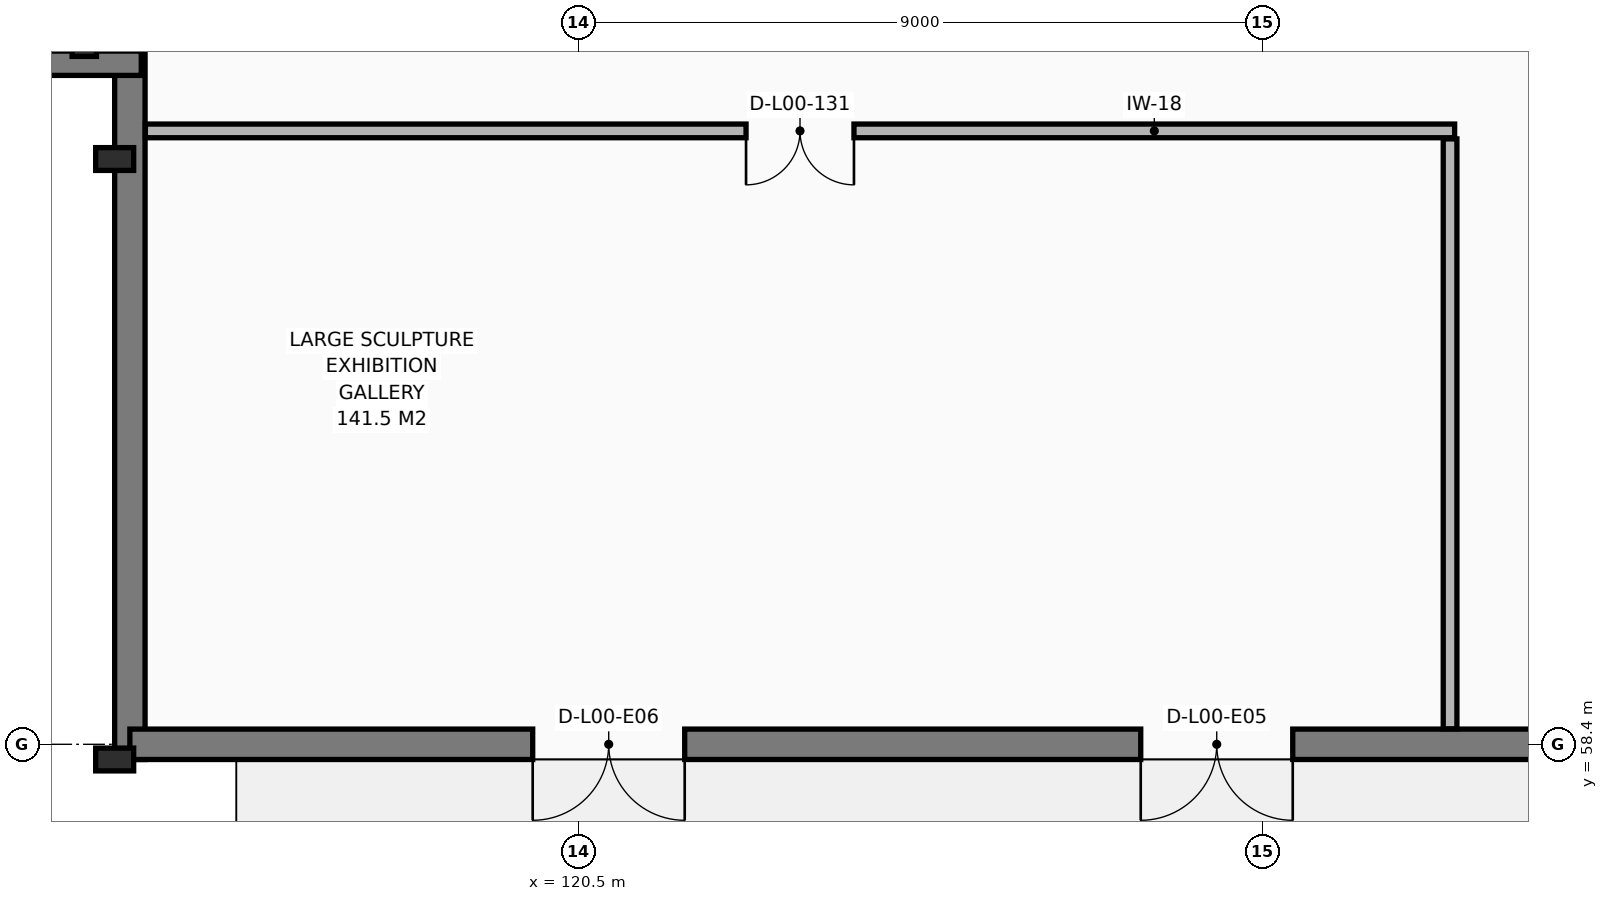
"""IFC4 building model, lengths in metres.
Left out: names, types, materials, properties, quantities, classifications, styles, units other than length and angle.
Written with IfcOpenShell. Run it as: python <this file> out.ifc"""

import sys

from ifc_helpers import new_model, si_unit, direction, frame, frame_2d, origin, origin_2d, place, context, subcontext, project, spatial, rectangle, i_section, extrude, element, fill, save


model = new_model("IFC4")
c1 = context("Model", 3, precision=1e-05, world=origin(), true_north=direction((0.0, 1.0)))
c2 = subcontext(c1, "Body", "Model", "MODEL_VIEW")
j1 = project(units=[si_unit("LENGTHUNIT", "METRE"), si_unit("PLANEANGLEUNIT", "RADIAN")], contexts=[c1])
p1 = place(None, origin())
s1 = spatial("IfcSite", under=j1, at=p1, CompositionType="ELEMENT")
p2 = place(p1, origin())
s2 = spatial("IfcBuilding", under=s1, at=p2, CompositionType="ELEMENT")
p3 = place(p2, origin())
s3 = spatial("IfcBuildingStorey", under=s2, at=p3, CompositionType="ELEMENT", Elevation=0.0)
for number, where, z_axis, x_axis in (
    (1, (114.4, 58.2, 0.0), (0.0, 0.0, 1.0), (1.0, 0.0, 0.0)),
    (2, (114.4, 66.1, 0.0), (0.0, 0.0, 1.0), (1.0, 0.0, 0.0)),
):
    element("IfcColumn", number, at=place(p3, frame(where, z_axis=z_axis, x_axis=x_axis)), inside=s3, PredefinedType="COLUMN", context=c2, shape_type="SweptSolid", body=[
        extrude(i_section(OverallWidth=0.3, OverallDepth=0.5, WebThickness=0.014, FlangeThickness=0.028, FilletRadius=0.027, at=origin_2d()), origin(), (0.0, 0.0, 1.0), 5.1),
    ])
p4 = place(p3, frame((114.0, 67.6, 0.0), z_axis=(0.0, 0.0, 1.0), x_axis=(1.0, 0.0, 0.0)))
e3 = element("IfcColumn", 3, at=p4, inside=s3, PredefinedType="COLUMN", context=c2, shape_type="SweptSolid", body=[
    extrude(i_section(OverallWidth=0.3, OverallDepth=0.32, WebThickness=0.011, FlangeThickness=0.021, FilletRadius=0.027, at=origin_2d()), origin(), (0.0, 0.0, 1.0), 5.1),
])
p5 = place(p3, frame((114.6, 58.2, 0.0), z_axis=(0.0, 0.0, 1.0), x_axis=(0.0, 1.0, 0.0)))
e4 = element("IfcWall", 4, at=p5, inside=s3, PredefinedType="SOLIDWALL", context=c2, shape_type="SweptSolid", body=[
    extrude(rectangle(XDim=9.32, YDim=0.4, at=frame_2d((4.66, 0.0))), origin(), (0.0, 0.0, 1.0), 4.88),
])
p6 = place(p3, frame((164.4, 58.4, 0.0), z_axis=(0.0, 0.0, 1.0), x_axis=(-1.0, 0.0, 0.0)))
e5 = element("IfcWall", 5, at=p6, inside=s3, PredefinedType="SOLIDWALL", context=c2, shape_type="SweptSolid", body=[
    extrude(rectangle(XDim=49.8, YDim=0.4, at=frame_2d((24.9, 0.0))), origin(), (0.0, 0.0, 1.0), 4.88),
])
p7 = place(p6, frame((4.5, 0.0, 0.0)))
e6 = element("IfcOpeningElement", 6, at=p7, cuts=e5, PredefinedType="OPENING", context=c2, shape_type="SweptSolid", body=[
    extrude(rectangle(XDim=2.0, YDim=2.3, at=frame_2d((1.0, 1.15))), frame((0.0, 0.21, 0.0), z_axis=(0.0, -1.0, 0.0), x_axis=(1.0, 0.0, 0.0)), (0.0, 0.0, 1.0), 0.42),
])
p8 = place(p6, frame((13.5, 0.0, 0.0)))
e7 = element("IfcOpeningElement", 7, at=p8, cuts=e5, PredefinedType="OPENING", context=c2, shape_type="SweptSolid", body=[
    extrude(rectangle(XDim=2.0, YDim=2.3, at=frame_2d((1.0, 1.15))), frame((0.0, 0.21, 0.0), z_axis=(0.0, -1.0, 0.0), x_axis=(1.0, 0.0, 0.0)), (0.0, 0.0, 1.0), 0.42),
])
p9 = place(p6, frame((24.0, 0.0, 0.0)))
e8 = element("IfcOpeningElement", 8, at=p9, cuts=e5, PredefinedType="OPENING", context=c2, shape_type="SweptSolid", body=[
    extrude(rectangle(XDim=2.0, YDim=2.3, at=frame_2d((1.0, 1.15))), frame((0.0, 0.21, 0.0), z_axis=(0.0, -1.0, 0.0), x_axis=(1.0, 0.0, 0.0)), (0.0, 0.0, 1.0), 0.42),
])
p10 = place(p6, frame((34.5, 0.0, 0.0)))
e9 = element("IfcOpeningElement", 9, at=p10, cuts=e5, PredefinedType="OPENING", context=c2, shape_type="SweptSolid", body=[
    extrude(rectangle(XDim=2.0, YDim=2.3, at=frame_2d((1.0, 1.15))), frame((0.0, 0.21, 0.0), z_axis=(0.0, -1.0, 0.0), x_axis=(1.0, 0.0, 0.0)), (0.0, 0.0, 1.0), 0.42),
])
p11 = place(p6, frame((42.5, 0.0, 0.0)))
e10 = element("IfcOpeningElement", 10, at=p11, cuts=e5, PredefinedType="OPENING", context=c2, shape_type="SweptSolid", body=[
    extrude(rectangle(XDim=2.0, YDim=2.3, at=frame_2d((1.0, 1.15))), frame((0.0, 0.21, 0.0), z_axis=(0.0, -1.0, 0.0), x_axis=(1.0, 0.0, 0.0)), (0.0, 0.0, 1.0), 0.42),
])
p12 = place(p3, frame((114.75, 67.36, 0.0), z_axis=(0.0, 0.0, 1.0), x_axis=(-1.0, 0.0, 0.0)))
e11 = element("IfcWall", 11, at=p12, inside=s3, PredefinedType="SOLIDWALL", context=c2, shape_type="SweptSolid", body=[
    extrude(rectangle(XDim=6.466, YDim=0.32, at=frame_2d((3.233, 0.0))), origin(), (0.0, 0.0, 1.0), 4.82),
])
p13 = place(p3, frame((132.03, 66.47, 0.0), z_axis=(0.0, 0.0, 1.0), x_axis=(-1.0, 0.0, 0.0)))
e12 = element("IfcWall", 12, at=p13, inside=s3, PredefinedType="PARTITIONING", context=c2, shape_type="SweptSolid", body=[
    extrude(rectangle(XDim=17.226, YDim=0.18, at=frame_2d((8.613, 0.0))), origin(), (0.0, 0.0, 1.0), 4.87),
])
p14 = place(p13, frame((7.903, 0.0, 0.0)))
e13 = element("IfcOpeningElement", 13, at=p14, cuts=e12, PredefinedType="OPENING", context=c2, shape_type="SweptSolid", body=[
    extrude(rectangle(XDim=1.42, YDim=2.18, at=frame_2d((0.71, 1.09))), frame((0.0, 0.1, 0.0), z_axis=(0.0, -1.0, 0.0), x_axis=(1.0, 0.0, 0.0)), (0.0, 0.0, 1.0), 0.2),
])
p15 = place(p3, frame((131.97, 58.604, 0.0), z_axis=(0.0, 0.0, 1.0), x_axis=(0.0, 1.0, 0.0)))
e14 = element("IfcWall", 14, at=p15, inside=s3, PredefinedType="PARTITIONING", context=c2, shape_type="SweptSolid", body=[
    extrude(rectangle(XDim=7.761, YDim=0.18, at=frame_2d((3.88, 0.0))), origin(), (0.0, 0.0, 1.0), 3.96),
])
p16 = place(p10, origin())
e15 = element("IfcDoor", 15, at=p16, inside=s3, OperationType="DOUBLE_DOOR_SINGLE_SWING", PredefinedType="DOOR", context=c2, shape_type="SweptSolid", body=[
    extrude(rectangle(XDim=2.0, YDim=2.3, at=frame_2d((1.0, 1.15))), frame((0.0, 0.025, 0.0), z_axis=(0.0, -1.0, 0.0), x_axis=(1.0, 0.0, 0.0)), (0.0, 0.0, 1.0), 0.05),
])
fill(e9, e15)
p17 = place(p11, origin())
e16 = element("IfcDoor", 16, at=p17, inside=s3, OperationType="DOUBLE_DOOR_SINGLE_SWING", PredefinedType="DOOR", context=c2, shape_type="SweptSolid", body=[
    extrude(rectangle(XDim=2.0, YDim=2.3, at=frame_2d((1.0, 1.15))), frame((0.0, 0.025, 0.0), z_axis=(0.0, -1.0, 0.0), x_axis=(1.0, 0.0, 0.0)), (0.0, 0.0, 1.0), 0.05),
])
fill(e10, e16)
p18 = place(p14, origin())
e17 = element("IfcDoor", 17, at=p18, inside=s3, OperationType="DOUBLE_DOOR_SINGLE_SWING", PredefinedType="DOOR", context=c2, shape_type="SweptSolid", body=[
    extrude(rectangle(XDim=1.42, YDim=2.18, at=frame_2d((0.71, 1.09))), frame((0.0, 0.025, 0.0), z_axis=(0.0, -1.0, 0.0), x_axis=(1.0, 0.0, 0.0)), (0.0, 0.0, 1.0), 0.05),
])
fill(e13, e17)
save(model, sys.argv[1])
